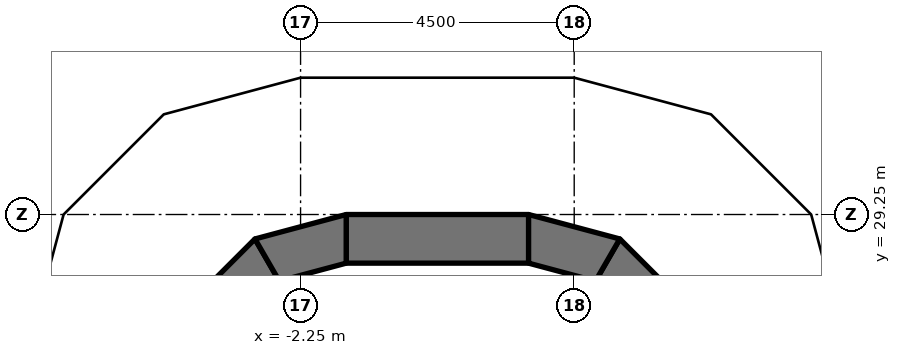
"""IFC4 building model, lengths in metres.
Left out: names, types, materials, properties, quantities, classifications, styles, units other than length and angle.
Written with IfcOpenShell. Run it as: python <this file> out.ifc"""

import sys

from ifc_helpers import new_model, si_unit, direction, frame, frame_2d, origin, place, context, subcontext, project, spatial, polyline, rectangle, outline, extrude, element, save


model = new_model("IFC4")
c1 = context("Model", 3, precision=1e-05, world=origin(), true_north=direction((0.0, 1.0)))
c2 = subcontext(c1, "Body", "Model", "MODEL_VIEW")
j1 = project(units=[si_unit("LENGTHUNIT", "METRE"), si_unit("PLANEANGLEUNIT", "RADIAN")], contexts=[c1])
p1 = place(None, origin())
s1 = spatial("IfcSite", under=j1, at=p1, CompositionType="ELEMENT")
p2 = place(p1, origin())
s2 = spatial("IfcBuilding", under=s1, at=p2, CompositionType="ELEMENT")
p3 = place(p2, frame((0.0, 0.0, 132.2)))
s3 = spatial("IfcBuildingStorey", under=s2, at=p3, CompositionType="ELEMENT", Elevation=132.2)
p4 = place(p3, frame((-1.5, 28.85, 0.0), z_axis=(0.0, 0.0, 1.0), x_axis=(1.0, 0.0, 0.0)))
e1 = element("IfcWall", 1, at=p4, inside=s3, PredefinedType="SHEAR", context=c2, shape_type="SweptSolid", body=[
    extrude(rectangle(XDim=3.0, YDim=0.8, at=frame_2d((1.5, 0.0))), origin(), (0.0, 0.0, 1.0), 3.8),
])
p5 = place(p3, origin())
e2 = element("IfcWall", 2, at=p5, inside=s3, PredefinedType="SHEAR", context=c2, shape_type="SweptSolid", body=[
    extrude(outline(polyline([(-4.098, 27.75), (-3.0, 28.848), (-2.6, 28.155), (-3.405, 27.35), (-4.098, 27.75)])), origin(), (0.0, 0.0, 1.0), 3.8),
])
p6 = place(p3, origin())
e3 = element("IfcWall", 3, at=p6, inside=s3, PredefinedType="SHEAR", context=c2, shape_type="SweptSolid", body=[
    extrude(outline(polyline([(-3.0, 28.848), (-1.5, 29.25), (-1.5, 28.45), (-2.6, 28.155), (-3.0, 28.848)])), origin(), (0.0, 0.0, 1.0), 3.8),
])
p7 = place(p3, origin())
e4 = element("IfcWall", 4, at=p7, inside=s3, PredefinedType="SHEAR", context=c2, shape_type="SweptSolid", body=[
    extrude(outline(polyline([(4.098, 27.75), (3.0, 28.848), (2.6, 28.155), (3.405, 27.35), (4.098, 27.75)])), origin(), (0.0, 0.0, 1.0), 3.8),
])
p8 = place(p3, origin())
e5 = element("IfcWall", 5, at=p8, inside=s3, PredefinedType="SHEAR", context=c2, shape_type="SweptSolid", body=[
    extrude(outline(polyline([(3.0, 28.848), (1.5, 29.25), (1.5, 28.45), (2.6, 28.155), (3.0, 28.848)])), origin(), (0.0, 0.0, 1.0), 3.8),
])
save(model, sys.argv[1])
